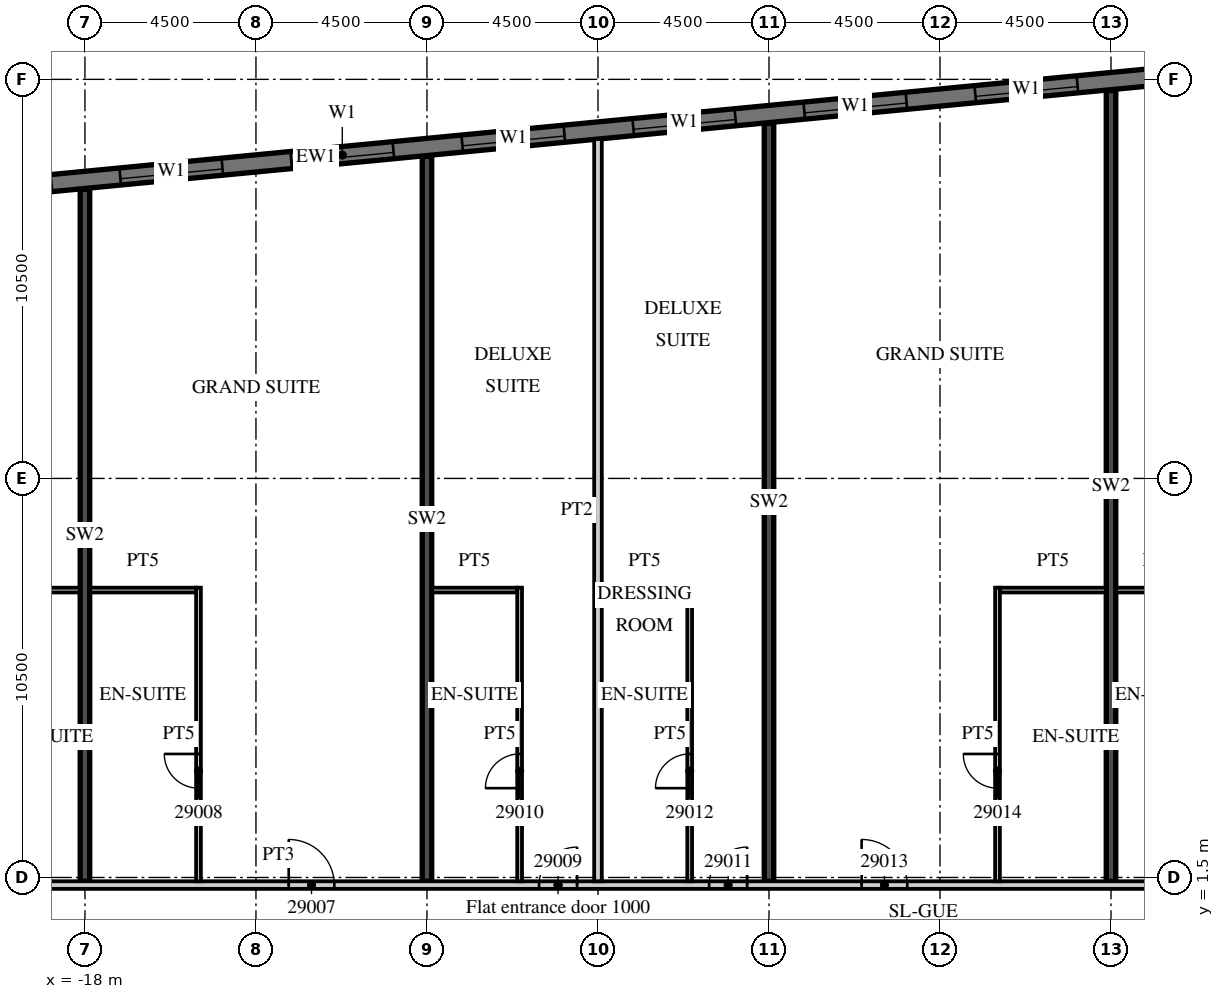
"""IFC4 building model, lengths in metres.
Left out: names, types, materials, properties, quantities, classifications, styles, units other than length and angle.
Written with IfcOpenShell. Run it as: python <this file> out.ifc"""

import sys

from ifc_helpers import new_model, si_unit, direction, frame, frame_2d, origin, place, context, subcontext, project, spatial, rectangle, extrude, element, fill, save


model = new_model("IFC4")
c1 = context("Model", 3, precision=1e-05, world=origin(), true_north=direction((0.0, 1.0)))
c2 = subcontext(c1, "Body", "Model", "MODEL_VIEW")
j1 = project(units=[si_unit("LENGTHUNIT", "METRE"), si_unit("PLANEANGLEUNIT", "RADIAN")], contexts=[c1])
p1 = place(None, origin())
s1 = spatial("IfcSite", under=j1, at=p1, CompositionType="ELEMENT")
p2 = place(p1, origin())
s2 = spatial("IfcBuilding", under=s1, at=p2, CompositionType="ELEMENT")
p3 = place(p2, frame((0.0, 0.0, 130.6)))
s3 = spatial("IfcBuildingStorey", under=s2, at=p3, CompositionType="ELEMENT", Elevation=130.6)
p4 = place(p3, frame((-18.0, 1.4, 0.0), z_axis=(0.0, 0.0, 1.0), x_axis=(0.0, 1.0, 0.0)))
e1 = element("IfcWall", 1, at=p4, inside=s3, PredefinedType="SHEAR", context=c2, shape_type="SweptSolid", body=[
    extrude(rectangle(XDim=18.207, YDim=0.25, at=frame_2d((9.104, 0.0))), origin(), (0.0, 0.0, 1.0), 3.3),
])
p5 = place(p3, frame((-9.0, 1.4, 0.0), z_axis=(0.0, 0.0, 1.0), x_axis=(0.0, 1.0, 0.0)))
e2 = element("IfcWall", 2, at=p5, inside=s3, PredefinedType="SHEAR", context=c2, shape_type="SweptSolid", body=[
    extrude(rectangle(XDim=19.073, YDim=0.25, at=frame_2d((9.537, 0.0))), origin(), (0.0, 0.0, 1.0), 3.3),
])
p6 = place(p3, frame((0.0, 1.4, 0.0), z_axis=(0.0, 0.0, 1.0), x_axis=(0.0, 1.0, 0.0)))
e3 = element("IfcWall", 3, at=p6, inside=s3, PredefinedType="SHEAR", context=c2, shape_type="SweptSolid", body=[
    extrude(rectangle(XDim=19.94, YDim=0.25, at=frame_2d((9.97, 0.0))), origin(), (0.0, 0.0, 1.0), 3.3),
])
p7 = place(p3, frame((9.0, 1.4, 0.0), z_axis=(0.0, 0.0, 1.0), x_axis=(0.0, 1.0, 0.0)))
e4 = element("IfcWall", 4, at=p7, inside=s3, PredefinedType="SHEAR", context=c2, shape_type="SweptSolid", body=[
    extrude(rectangle(XDim=20.807, YDim=0.25, at=frame_2d((10.403, 0.0))), origin(), (0.0, 0.0, 1.0), 3.3),
])
p8 = place(p3, frame((13.521, 22.89, 0.0), z_axis=(0.0, 0.0, 1.0), x_axis=(-0.995396445054, -0.095843190545, 0.0)))
e5 = element("IfcWall", 5, at=p8, inside=s3, PredefinedType="SOLIDWALL", context=c2, shape_type="SweptSolid", body=[
    extrude(rectangle(XDim=51.114, YDim=0.45, at=frame_2d((25.557, 0.0))), origin(), (0.0, 0.0, 1.0), 3.02),
])
p9 = place(p8, frame((0.91, 0.0, 0.45)))
e6 = element("IfcOpeningElement", 6, at=p9, cuts=e5, PredefinedType="OPENING", context=c2, shape_type="SweptSolid", body=[
    extrude(rectangle(XDim=2.7, YDim=2.25, at=frame_2d((1.35, 1.125))), frame((0.0, 0.235, 0.0), z_axis=(0.0, -1.0, 0.0), x_axis=(1.0, 0.0, 0.0)), (0.0, 0.0, 1.0), 0.47),
])
p10 = place(p8, frame((5.431, 0.0, 0.45)))
e7 = element("IfcOpeningElement", 7, at=p10, cuts=e5, PredefinedType="OPENING", context=c2, shape_type="SweptSolid", body=[
    extrude(rectangle(XDim=2.7, YDim=2.25, at=frame_2d((1.35, 1.125))), frame((0.0, 0.235, 0.0), z_axis=(0.0, -1.0, 0.0), x_axis=(1.0, 0.0, 0.0)), (0.0, 0.0, 1.0), 0.47),
])
p11 = place(p8, frame((9.952, 0.0, 0.45)))
e8 = element("IfcOpeningElement", 8, at=p11, cuts=e5, PredefinedType="OPENING", context=c2, shape_type="SweptSolid", body=[
    extrude(rectangle(XDim=2.7, YDim=2.25, at=frame_2d((1.35, 1.125))), frame((0.0, 0.235, 0.0), z_axis=(0.0, -1.0, 0.0), x_axis=(1.0, 0.0, 0.0)), (0.0, 0.0, 1.0), 0.47),
])
p12 = place(p8, frame((14.473, 0.0, 0.45)))
e9 = element("IfcOpeningElement", 9, at=p12, cuts=e5, PredefinedType="OPENING", context=c2, shape_type="SweptSolid", body=[
    extrude(rectangle(XDim=2.7, YDim=2.25, at=frame_2d((1.35, 1.125))), frame((0.0, 0.235, 0.0), z_axis=(0.0, -1.0, 0.0), x_axis=(1.0, 0.0, 0.0)), (0.0, 0.0, 1.0), 0.47),
])
p13 = place(p8, frame((18.994, 0.0, 0.45)))
e10 = element("IfcOpeningElement", 10, at=p13, cuts=e5, PredefinedType="OPENING", context=c2, shape_type="SweptSolid", body=[
    extrude(rectangle(XDim=2.7, YDim=2.25, at=frame_2d((1.35, 1.125))), frame((0.0, 0.235, 0.0), z_axis=(0.0, -1.0, 0.0), x_axis=(1.0, 0.0, 0.0)), (0.0, 0.0, 1.0), 0.47),
])
p14 = place(p8, frame((23.514, 0.0, 0.45)))
e11 = element("IfcOpeningElement", 11, at=p14, cuts=e5, PredefinedType="OPENING", context=c2, shape_type="SweptSolid", body=[
    extrude(rectangle(XDim=2.7, YDim=2.25, at=frame_2d((1.35, 1.125))), frame((0.0, 0.235, 0.0), z_axis=(0.0, -1.0, 0.0), x_axis=(1.0, 0.0, 0.0)), (0.0, 0.0, 1.0), 0.47),
])
p15 = place(p8, frame((28.035, 0.0, 0.45)))
e12 = element("IfcOpeningElement", 12, at=p15, cuts=e5, PredefinedType="OPENING", context=c2, shape_type="SweptSolid", body=[
    extrude(rectangle(XDim=2.7, YDim=2.25, at=frame_2d((1.35, 1.125))), frame((0.0, 0.235, 0.0), z_axis=(0.0, -1.0, 0.0), x_axis=(1.0, 0.0, 0.0)), (0.0, 0.0, 1.0), 0.47),
])
p16 = place(p8, frame((32.556, 0.0, 0.45)))
e13 = element("IfcOpeningElement", 13, at=p16, cuts=e5, PredefinedType="OPENING", context=c2, shape_type="SweptSolid", body=[
    extrude(rectangle(XDim=2.7, YDim=2.25, at=frame_2d((1.35, 1.125))), frame((0.0, 0.235, 0.0), z_axis=(0.0, -1.0, 0.0), x_axis=(1.0, 0.0, 0.0)), (0.0, 0.0, 1.0), 0.47),
])
p17 = place(p8, frame((37.077, 0.0, 0.45)))
e14 = element("IfcOpeningElement", 14, at=p17, cuts=e5, PredefinedType="OPENING", context=c2, shape_type="SweptSolid", body=[
    extrude(rectangle(XDim=2.7, YDim=2.25, at=frame_2d((1.35, 1.125))), frame((0.0, 0.235, 0.0), z_axis=(0.0, -1.0, 0.0), x_axis=(1.0, 0.0, 0.0)), (0.0, 0.0, 1.0), 0.47),
])
p18 = place(p8, frame((41.598, 0.0, 0.45)))
e15 = element("IfcOpeningElement", 15, at=p18, cuts=e5, PredefinedType="OPENING", context=c2, shape_type="SweptSolid", body=[
    extrude(rectangle(XDim=2.7, YDim=2.25, at=frame_2d((1.35, 1.125))), frame((0.0, 0.235, 0.0), z_axis=(0.0, -1.0, 0.0), x_axis=(1.0, 0.0, 0.0)), (0.0, 0.0, 1.0), 0.47),
])
p19 = place(p8, frame((46.118, 0.0, 0.45)))
e16 = element("IfcOpeningElement", 16, at=p19, cuts=e5, PredefinedType="OPENING", context=c2, shape_type="SweptSolid", body=[
    extrude(rectangle(XDim=2.7, YDim=2.25, at=frame_2d((1.35, 1.125))), frame((0.0, 0.235, 0.0), z_axis=(0.0, -1.0, 0.0), x_axis=(1.0, 0.0, 0.0)), (0.0, 0.0, 1.0), 0.47),
])
p20 = place(p3, frame((-39.316, 1.3, 0.0), z_axis=(0.0, 0.0, 1.0), x_axis=(1.0, 0.0, 0.0)))
e17 = element("IfcWall", 17, at=p20, inside=s3, PredefinedType="PARTITIONING", context=c2, shape_type="SweptSolid", body=[
    extrude(rectangle(XDim=52.816, YDim=0.2, at=frame_2d((26.408, 0.0))), origin(), (0.0, 0.0, 1.0), 3.02),
])
p21 = place(p20, frame((0.15, 0.0, 0.0)))
e18 = element("IfcOpeningElement", 18, at=p21, cuts=e17, PredefinedType="OPENING", context=c2, shape_type="SweptSolid", body=[
    extrude(rectangle(XDim=0.9, YDim=2.1, at=frame_2d((0.45, 1.05))), frame((0.0, 0.11, 0.0), z_axis=(0.0, -1.0, 0.0), x_axis=(1.0, 0.0, 0.0)), (0.0, 0.0, 1.0), 0.22),
])
p22 = place(p20, frame((8.679, 0.0, 0.0)))
e19 = element("IfcOpeningElement", 19, at=p22, cuts=e17, PredefinedType="OPENING", context=c2, shape_type="SweptSolid", body=[
    extrude(rectangle(XDim=1.2, YDim=2.1, at=frame_2d((0.6, 1.05))), frame((0.0, 0.11, 0.0), z_axis=(0.0, -1.0, 0.0), x_axis=(1.0, 0.0, 0.0)), (0.0, 0.0, 1.0), 0.22),
])
p23 = place(p20, frame((14.754, 0.0, 0.0)))
e20 = element("IfcOpeningElement", 20, at=p23, cuts=e17, PredefinedType="OPENING", context=c2, shape_type="SweptSolid", body=[
    extrude(rectangle(XDim=1.2, YDim=2.1, at=frame_2d((0.6, 1.05))), frame((0.0, 0.11, 0.0), z_axis=(0.0, -1.0, 0.0), x_axis=(1.0, 0.0, 0.0)), (0.0, 0.0, 1.0), 0.22),
])
p24 = place(p20, frame((26.678, 0.0, 0.0)))
e21 = element("IfcOpeningElement", 21, at=p24, cuts=e17, PredefinedType="OPENING", context=c2, shape_type="SweptSolid", body=[
    extrude(rectangle(XDim=1.2, YDim=2.1, at=frame_2d((0.6, 1.05))), frame((0.0, 0.11, 0.0), z_axis=(0.0, -1.0, 0.0), x_axis=(1.0, 0.0, 0.0)), (0.0, 0.0, 1.0), 0.22),
])
p25 = place(p20, frame((33.266, 0.0, 0.0)))
e22 = element("IfcOpeningElement", 22, at=p25, cuts=e17, PredefinedType="OPENING", context=c2, shape_type="SweptSolid", body=[
    extrude(rectangle(XDim=1.0, YDim=2.1, at=frame_2d((0.5, 1.05))), frame((0.0, 0.11, 0.0), z_axis=(0.0, -1.0, 0.0), x_axis=(1.0, 0.0, 0.0)), (0.0, 0.0, 1.0), 0.22),
])
p26 = place(p20, frame((37.741, 0.0, 0.0)))
e23 = element("IfcOpeningElement", 23, at=p26, cuts=e17, PredefinedType="OPENING", context=c2, shape_type="SweptSolid", body=[
    extrude(rectangle(XDim=1.0, YDim=2.1, at=frame_2d((0.5, 1.05))), frame((0.0, 0.11, 0.0), z_axis=(0.0, -1.0, 0.0), x_axis=(1.0, 0.0, 0.0)), (0.0, 0.0, 1.0), 0.22),
])
p27 = place(p20, frame((41.754, 0.0, 0.0)))
e24 = element("IfcOpeningElement", 24, at=p27, cuts=e17, PredefinedType="OPENING", context=c2, shape_type="SweptSolid", body=[
    extrude(rectangle(XDim=1.2, YDim=2.1, at=frame_2d((0.6, 1.05))), frame((0.0, 0.11, 0.0), z_axis=(0.0, -1.0, 0.0), x_axis=(1.0, 0.0, 0.0)), (0.0, 0.0, 1.0), 0.22),
])
p28 = place(p20, frame((51.241, 0.0, 0.0)))
e25 = element("IfcOpeningElement", 25, at=p28, cuts=e17, PredefinedType="OPENING", context=c2, shape_type="SweptSolid", body=[
    extrude(rectangle(XDim=1.0, YDim=2.1, at=frame_2d((0.5, 1.05))), frame((0.0, 0.11, 0.0), z_axis=(0.0, -1.0, 0.0), x_axis=(1.0, 0.0, 0.0)), (0.0, 0.0, 1.0), 0.22),
])
p29 = place(p3, frame((-20.925, 9.062, 0.0), z_axis=(0.0, 0.0, 1.0), x_axis=(1.0, 0.0, 0.0)))
e26 = element("IfcWall", 26, at=p29, inside=s3, PredefinedType="PARTITIONING", context=c2, shape_type="SweptSolid", body=[
    extrude(rectangle(XDim=2.8, YDim=0.125, at=frame_2d((1.4, 0.0))), origin(), (0.0, 0.0, 1.0), 3.02),
])
p30 = place(p3, frame((-15.012, 1.4, 0.0), z_axis=(0.0, 0.0, 1.0), x_axis=(0.0, 1.0, 0.0)))
e27 = element("IfcWall", 27, at=p30, inside=s3, PredefinedType="PARTITIONING", context=c2, shape_type="SweptSolid", body=[
    extrude(rectangle(XDim=7.725, YDim=0.125, at=frame_2d((3.863, 0.0))), origin(), (0.0, 0.0, 1.0), 3.02),
])
p31 = place(p30, frame((2.45, 0.0, 0.0)))
e28 = element("IfcOpeningElement", 28, at=p31, cuts=e27, PredefinedType="OPENING", context=c2, shape_type="SweptSolid", body=[
    extrude(rectangle(XDim=0.9, YDim=2.1, at=frame_2d((0.45, 1.05))), frame((0.0, 0.073, 0.0), z_axis=(0.0, -1.0, 0.0), x_axis=(1.0, 0.0, 0.0)), (0.0, 0.0, 1.0), 0.145),
])
p32 = place(p3, frame((-17.875, 9.062, 0.0), z_axis=(0.0, 0.0, 1.0), x_axis=(1.0, 0.0, 0.0)))
e29 = element("IfcWall", 29, at=p32, inside=s3, PredefinedType="PARTITIONING", context=c2, shape_type="SweptSolid", body=[
    extrude(rectangle(XDim=2.8, YDim=0.125, at=frame_2d((1.4, 0.0))), origin(), (0.0, 0.0, 1.0), 3.02),
])
p33 = place(p3, frame((-4.5, 1.4, 0.0), z_axis=(0.0, 0.0, 1.0), x_axis=(0.0, 1.0, 0.0)))
e30 = element("IfcWall", 30, at=p33, inside=s3, PredefinedType="PARTITIONING", context=c2, shape_type="SweptSolid", body=[
    extrude(rectangle(XDim=19.529, YDim=0.2, at=frame_2d((9.765, 0.0))), origin(), (0.0, 0.0, 1.0), 3.02),
])
p34 = place(p3, frame((-6.562, 1.4, 0.0), z_axis=(0.0, 0.0, 1.0), x_axis=(0.0, 1.0, 0.0)))
e31 = element("IfcWall", 31, at=p34, inside=s3, PredefinedType="PARTITIONING", context=c2, shape_type="SweptSolid", body=[
    extrude(rectangle(XDim=7.725, YDim=0.125, at=frame_2d((3.863, 0.0))), origin(), (0.0, 0.0, 1.0), 3.02),
])
p35 = place(p34, frame((2.45, 0.0, 0.0)))
e32 = element("IfcOpeningElement", 32, at=p35, cuts=e31, PredefinedType="OPENING", context=c2, shape_type="SweptSolid", body=[
    extrude(rectangle(XDim=0.9, YDim=2.1, at=frame_2d((0.45, 1.05))), frame((0.0, 0.073, 0.0), z_axis=(0.0, -1.0, 0.0), x_axis=(1.0, 0.0, 0.0)), (0.0, 0.0, 1.0), 0.145),
])
p36 = place(p3, frame((-8.875, 9.062, 0.0), z_axis=(0.0, 0.0, 1.0), x_axis=(1.0, 0.0, 0.0)))
e33 = element("IfcWall", 33, at=p36, inside=s3, PredefinedType="PARTITIONING", context=c2, shape_type="SweptSolid", body=[
    extrude(rectangle(XDim=2.25, YDim=0.125, at=frame_2d((1.125, 0.0))), origin(), (0.0, 0.0, 1.0), 3.02),
])
p37 = place(p3, frame((-2.087, 1.4, 0.0), z_axis=(0.0, 0.0, 1.0), x_axis=(0.0, 1.0, 0.0)))
e34 = element("IfcWall", 34, at=p37, inside=s3, PredefinedType="PARTITIONING", context=c2, shape_type="SweptSolid", body=[
    extrude(rectangle(XDim=7.725, YDim=0.125, at=frame_2d((3.863, 0.0))), origin(), (0.0, 0.0, 1.0), 3.02),
])
p38 = place(p37, frame((2.45, 0.0, 0.0)))
e35 = element("IfcOpeningElement", 35, at=p38, cuts=e34, PredefinedType="OPENING", context=c2, shape_type="SweptSolid", body=[
    extrude(rectangle(XDim=0.9, YDim=2.1, at=frame_2d((0.45, 1.05))), frame((0.0, 0.073, 0.0), z_axis=(0.0, -1.0, 0.0), x_axis=(1.0, 0.0, 0.0)), (0.0, 0.0, 1.0), 0.145),
])
p39 = place(p3, frame((-4.4, 9.062, 0.0), z_axis=(0.0, 0.0, 1.0), x_axis=(1.0, 0.0, 0.0)))
e36 = element("IfcWall", 36, at=p39, inside=s3, PredefinedType="PARTITIONING", context=c2, shape_type="SweptSolid", body=[
    extrude(rectangle(XDim=2.25, YDim=0.125, at=frame_2d((1.125, 0.0))), origin(), (0.0, 0.0, 1.0), 3.02),
])
p40 = place(p3, frame((6.013, 1.4, 0.0), z_axis=(0.0, 0.0, 1.0), x_axis=(0.0, 1.0, 0.0)))
e37 = element("IfcWall", 37, at=p40, inside=s3, PredefinedType="PARTITIONING", context=c2, shape_type="SweptSolid", body=[
    extrude(rectangle(XDim=7.725, YDim=0.125, at=frame_2d((3.863, 0.0))), origin(), (0.0, 0.0, 1.0), 3.02),
])
p41 = place(p40, frame((2.45, 0.0, 0.0)))
e38 = element("IfcOpeningElement", 38, at=p41, cuts=e37, PredefinedType="OPENING", context=c2, shape_type="SweptSolid", body=[
    extrude(rectangle(XDim=0.9, YDim=2.1, at=frame_2d((0.45, 1.05))), frame((0.0, 0.073, 0.0), z_axis=(0.0, -1.0, 0.0), x_axis=(1.0, 0.0, 0.0)), (0.0, 0.0, 1.0), 0.145),
])
p42 = place(p3, frame((6.075, 9.062, 0.0), z_axis=(0.0, 0.0, 1.0), x_axis=(1.0, 0.0, 0.0)))
e39 = element("IfcWall", 39, at=p42, inside=s3, PredefinedType="PARTITIONING", context=c2, shape_type="SweptSolid", body=[
    extrude(rectangle(XDim=2.8, YDim=0.125, at=frame_2d((1.4, 0.0))), origin(), (0.0, 0.0, 1.0), 3.02),
])
p43 = place(p3, frame((9.125, 9.062, 0.0), z_axis=(0.0, 0.0, 1.0), x_axis=(1.0, 0.0, 0.0)))
e40 = element("IfcWall", 40, at=p43, inside=s3, PredefinedType="PARTITIONING", context=c2, shape_type="SweptSolid", body=[
    extrude(rectangle(XDim=2.25, YDim=0.125, at=frame_2d((1.125, 0.0))), origin(), (0.0, 0.0, 1.0), 3.02),
])
p44 = place(p10, origin())
e41 = element("IfcWindow", 41, at=p44, inside=s3, PartitioningType="SINGLE_PANEL", PredefinedType="WINDOW", context=c2, shape_type="SweptSolid", body=[
    extrude(rectangle(XDim=2.7, YDim=2.25, at=frame_2d((1.35, 1.125))), frame((0.0, 0.09, 0.0), z_axis=(0.0, -1.0, 0.0), x_axis=(1.0, 0.0, 0.0)), (0.0, 0.0, 1.0), 0.06),
])
fill(e7, e41)
p45 = place(p11, origin())
e42 = element("IfcWindow", 42, at=p45, inside=s3, PartitioningType="SINGLE_PANEL", PredefinedType="WINDOW", context=c2, shape_type="SweptSolid", body=[
    extrude(rectangle(XDim=2.7, YDim=2.25, at=frame_2d((1.35, 1.125))), frame((0.0, 0.09, 0.0), z_axis=(0.0, -1.0, 0.0), x_axis=(1.0, 0.0, 0.0)), (0.0, 0.0, 1.0), 0.06),
])
fill(e8, e42)
p46 = place(p12, origin())
e43 = element("IfcWindow", 43, at=p46, inside=s3, PartitioningType="SINGLE_PANEL", PredefinedType="WINDOW", context=c2, shape_type="SweptSolid", body=[
    extrude(rectangle(XDim=2.7, YDim=2.25, at=frame_2d((1.35, 1.125))), frame((0.0, 0.09, 0.0), z_axis=(0.0, -1.0, 0.0), x_axis=(1.0, 0.0, 0.0)), (0.0, 0.0, 1.0), 0.06),
])
fill(e9, e43)
p47 = place(p13, origin())
e44 = element("IfcWindow", 44, at=p47, inside=s3, PartitioningType="SINGLE_PANEL", PredefinedType="WINDOW", context=c2, shape_type="SweptSolid", body=[
    extrude(rectangle(XDim=2.7, YDim=2.25, at=frame_2d((1.35, 1.125))), frame((0.0, 0.09, 0.0), z_axis=(0.0, -1.0, 0.0), x_axis=(1.0, 0.0, 0.0)), (0.0, 0.0, 1.0), 0.06),
])
fill(e10, e44)
p48 = place(p14, origin())
e45 = element("IfcWindow", 45, at=p48, inside=s3, PartitioningType="SINGLE_PANEL", PredefinedType="WINDOW", context=c2, shape_type="SweptSolid", body=[
    extrude(rectangle(XDim=2.7, YDim=2.25, at=frame_2d((1.35, 1.125))), frame((0.0, 0.09, 0.0), z_axis=(0.0, -1.0, 0.0), x_axis=(1.0, 0.0, 0.0)), (0.0, 0.0, 1.0), 0.06),
])
fill(e11, e45)
p49 = place(p15, origin())
e46 = element("IfcWindow", 46, at=p49, inside=s3, PartitioningType="SINGLE_PANEL", PredefinedType="WINDOW", context=c2, shape_type="SweptSolid", body=[
    extrude(rectangle(XDim=2.7, YDim=2.25, at=frame_2d((1.35, 1.125))), frame((0.0, 0.09, 0.0), z_axis=(0.0, -1.0, 0.0), x_axis=(1.0, 0.0, 0.0)), (0.0, 0.0, 1.0), 0.06),
])
fill(e12, e46)
p50 = place(p24, origin())
e47 = element("IfcDoor", 47, at=p50, inside=s3, OperationType="SINGLE_SWING_LEFT", PredefinedType="DOOR", context=c2, shape_type="SweptSolid", body=[
    extrude(rectangle(XDim=1.2, YDim=2.1, at=frame_2d((0.6, 1.05))), frame((0.0, 0.025, 0.0), z_axis=(0.0, -1.0, 0.0), x_axis=(1.0, 0.0, 0.0)), (0.0, 0.0, 1.0), 0.05),
])
fill(e21, e47)
p51 = place(p31, origin())
e48 = element("IfcDoor", 48, at=p51, inside=s3, OperationType="SINGLE_SWING_RIGHT", PredefinedType="DOOR", context=c2, shape_type="SweptSolid", body=[
    extrude(rectangle(XDim=0.9, YDim=2.1, at=frame_2d((0.45, 1.05))), frame((0.0, 0.025, 0.0), z_axis=(0.0, -1.0, 0.0), x_axis=(1.0, 0.0, 0.0)), (0.0, 0.0, 1.0), 0.05),
])
fill(e28, e48)
p52 = place(p25, origin())
e49 = element("IfcDoor", 49, at=p52, inside=s3, OperationType="SINGLE_SWING_RIGHT", PredefinedType="DOOR", context=c2, shape_type="SweptSolid", body=[
    extrude(rectangle(XDim=1.0, YDim=2.1, at=frame_2d((0.5, 1.05))), frame((0.0, 0.025, 0.0), z_axis=(0.0, -1.0, 0.0), x_axis=(1.0, 0.0, 0.0)), (0.0, 0.0, 1.0), 0.05),
])
fill(e22, e49)
p53 = place(p35, origin())
e50 = element("IfcDoor", 50, at=p53, inside=s3, OperationType="SINGLE_SWING_LEFT", PredefinedType="DOOR", context=c2, shape_type="SweptSolid", body=[
    extrude(rectangle(XDim=0.9, YDim=2.1, at=frame_2d((0.45, 1.05))), frame((0.0, 0.025, 0.0), z_axis=(0.0, -1.0, 0.0), x_axis=(1.0, 0.0, 0.0)), (0.0, 0.0, 1.0), 0.05),
])
fill(e32, e50)
p54 = place(p26, origin())
e51 = element("IfcDoor", 51, at=p54, inside=s3, OperationType="SINGLE_SWING_RIGHT", PredefinedType="DOOR", context=c2, shape_type="SweptSolid", body=[
    extrude(rectangle(XDim=1.0, YDim=2.1, at=frame_2d((0.5, 1.05))), frame((0.0, 0.025, 0.0), z_axis=(0.0, -1.0, 0.0), x_axis=(1.0, 0.0, 0.0)), (0.0, 0.0, 1.0), 0.05),
])
fill(e23, e51)
p55 = place(p38, origin())
e52 = element("IfcDoor", 52, at=p55, inside=s3, OperationType="SINGLE_SWING_LEFT", PredefinedType="DOOR", context=c2, shape_type="SweptSolid", body=[
    extrude(rectangle(XDim=0.9, YDim=2.1, at=frame_2d((0.45, 1.05))), frame((0.0, 0.025, 0.0), z_axis=(0.0, -1.0, 0.0), x_axis=(1.0, 0.0, 0.0)), (0.0, 0.0, 1.0), 0.05),
])
fill(e35, e52)
p56 = place(p27, origin())
e53 = element("IfcDoor", 53, at=p56, inside=s3, OperationType="SINGLE_SWING_LEFT", PredefinedType="DOOR", context=c2, shape_type="SweptSolid", body=[
    extrude(rectangle(XDim=1.2, YDim=2.1, at=frame_2d((0.6, 1.05))), frame((0.0, 0.025, 0.0), z_axis=(0.0, -1.0, 0.0), x_axis=(1.0, 0.0, 0.0)), (0.0, 0.0, 1.0), 0.05),
])
fill(e24, e53)
p57 = place(p41, origin())
e54 = element("IfcDoor", 54, at=p57, inside=s3, OperationType="SINGLE_SWING_RIGHT", PredefinedType="DOOR", context=c2, shape_type="SweptSolid", body=[
    extrude(rectangle(XDim=0.9, YDim=2.1, at=frame_2d((0.45, 1.05))), frame((0.0, 0.025, 0.0), z_axis=(0.0, -1.0, 0.0), x_axis=(1.0, 0.0, 0.0)), (0.0, 0.0, 1.0), 0.05),
])
fill(e38, e54)
save(model, sys.argv[1])
